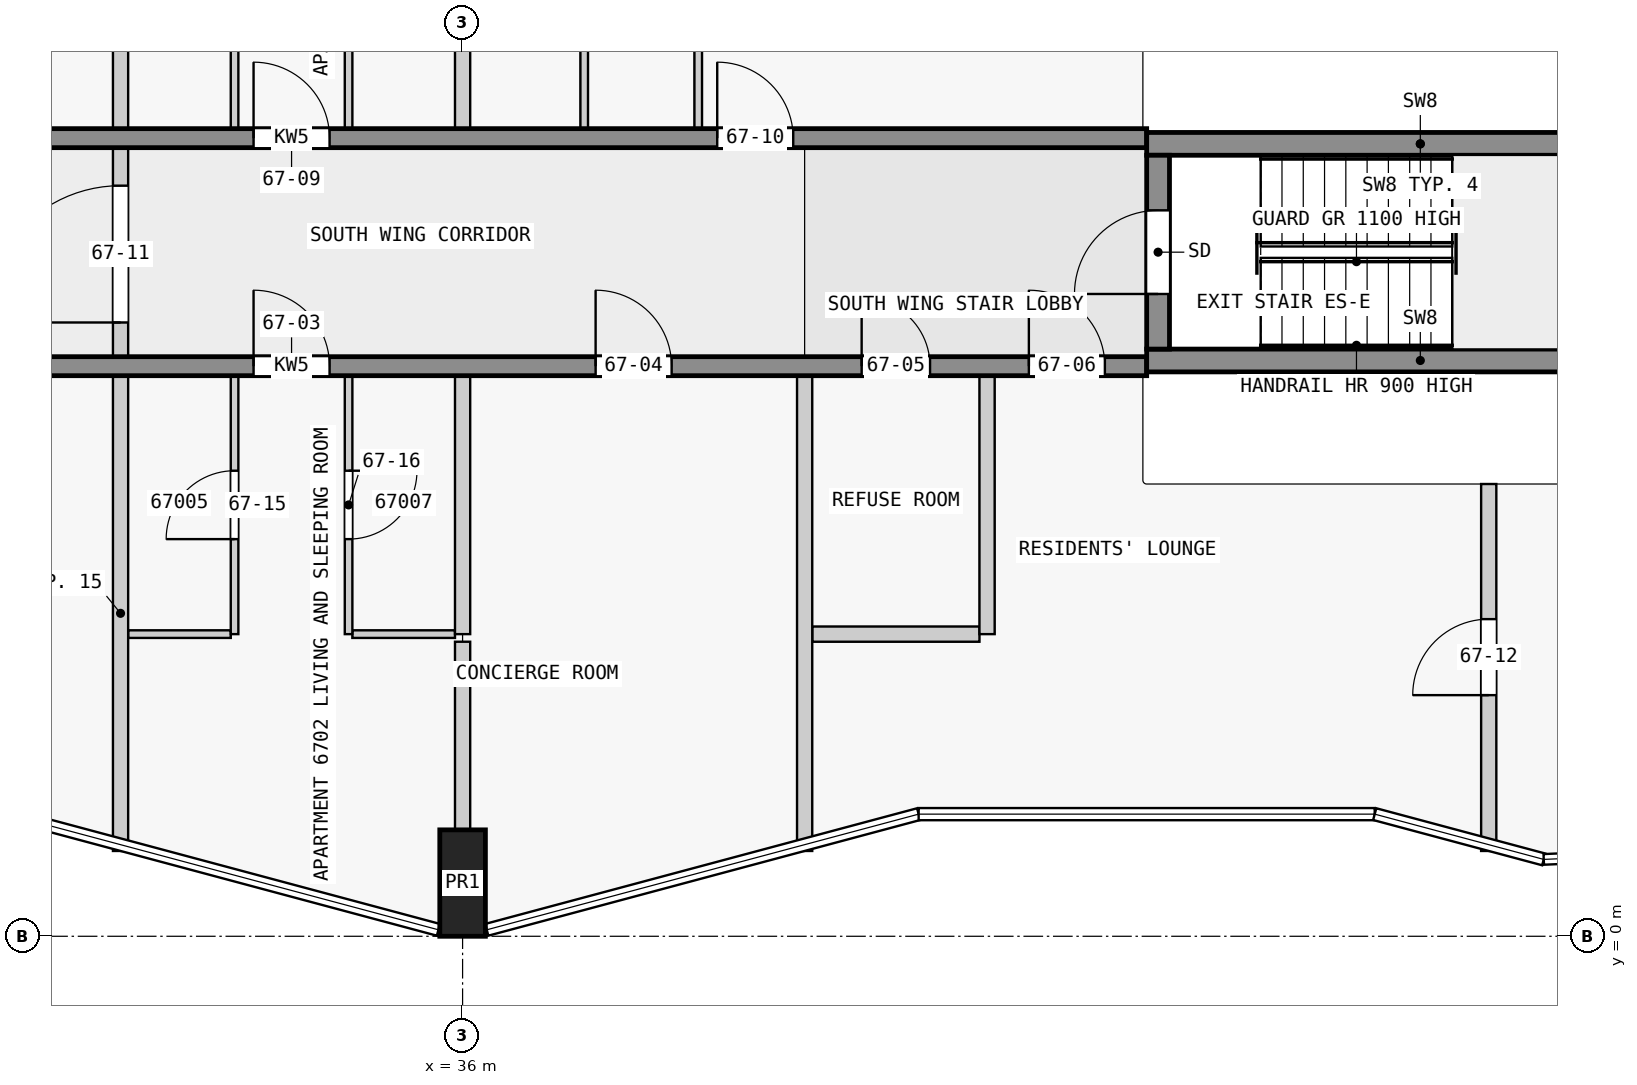
"""IFC4 building model, lengths in metres.
Left out: names, types, materials, properties, quantities, classifications, styles, units other than length and angle.
Written with IfcOpenShell. Run it as: python <this file> out.ifc"""

import sys

from ifc_helpers import new_model, si_unit, direction, frame, frame_2d, origin, origin_2d, place, context, subcontext, project, spatial, rectangle, extrude, element, fill, save


model = new_model("IFC4")
c1 = context("Model", 3, precision=1e-05, world=origin(), true_north=direction((0.0, 1.0)))
c2 = subcontext(c1, "Body", "Model", "MODEL_VIEW")
j1 = project(units=[si_unit("LENGTHUNIT", "METRE"), si_unit("PLANEANGLEUNIT", "RADIAN")], contexts=[c1])
p1 = place(None, origin())
s1 = spatial("IfcSite", under=j1, at=p1, CompositionType="ELEMENT")
p2 = place(p1, origin())
s2 = spatial("IfcBuilding", under=s1, at=p2, CompositionType="ELEMENT")
p3 = place(p2, frame((0.0, 0.0, 256.4)))
s3 = spatial("IfcBuildingStorey", under=s2, at=p3, CompositionType="ELEMENT", Elevation=256.4)
p4 = place(p3, frame((36.0, 0.7, 0.0), z_axis=(0.0, 0.0, 1.0), x_axis=(1.0, 0.0, 0.0)))
e1 = element("IfcColumn", 1, at=p4, inside=s3, PredefinedType="COLUMN", context=c2, shape_type="SweptSolid", body=[
    extrude(rectangle(XDim=0.6, YDim=1.4, at=origin_2d()), origin(), (0.0, 0.0, 1.0), 3.5),
])
p5 = place(p3, frame((45.15, 7.725, 0.0), z_axis=(0.0, 0.0, 1.0), x_axis=(0.0, 1.0, 0.0)))
e2 = element("IfcWall", 2, at=p5, inside=s3, PredefinedType="SHEAR", context=c2, shape_type="SweptSolid", body=[
    extrude(rectangle(XDim=2.55, YDim=0.3, at=frame_2d((1.275, 0.0))), origin(), (0.0, 0.0, 1.0), 3.5),
])
p6 = place(p5, frame((0.725, 0.0, 0.0)))
e3 = element("IfcOpeningElement", 3, at=p6, cuts=e2, PredefinedType="OPENING", context=c2, shape_type="SweptSolid", body=[
    extrude(rectangle(XDim=1.1, YDim=2.1, at=frame_2d((0.55, 1.05))), frame((0.0, 0.16, 0.0), z_axis=(0.0, -1.0, 0.0), x_axis=(1.0, 0.0, 0.0)), (0.0, 0.0, 1.0), 0.32),
])
for number, where, z_axis, x_axis in (
    (4, (45.0, 7.575, 0.0), (0.0, 0.0, 1.0), (1.0, 0.0, 0.0)),
    (5, (45.0, 10.425, 0.0), (0.0, 0.0, 1.0), (1.0, 0.0, 0.0)),
):
    element("IfcWall", number, at=place(p3, frame(where, z_axis=z_axis, x_axis=x_axis)), inside=s3, PredefinedType="SHEAR", context=c2, shape_type="SweptSolid", body=[
        extrude(rectangle(XDim=7.2, YDim=0.3, at=frame_2d((3.6, 0.0))), origin(), (0.0, 0.0, 1.0), 3.5),
    ])
p7 = place(p3, frame((22.5, 7.5, 0.0), z_axis=(0.0, 0.0, 1.0), x_axis=(1.0, 0.0, 0.0)))
e6 = element("IfcWall", 6, at=p7, inside=s3, PredefinedType="SHEAR", context=c2, shape_type="SweptSolid", body=[
    extrude(rectangle(XDim=22.5, YDim=0.25, at=frame_2d((11.25, 0.0))), origin(), (0.0, 0.0, 1.0), 3.25),
])
p8 = place(p7, frame((1.75, 0.0, 0.0)))
e7 = element("IfcOpeningElement", 7, at=p8, cuts=e6, PredefinedType="OPENING", context=c2, shape_type="SweptSolid", body=[
    extrude(rectangle(XDim=1.0, YDim=2.1, at=frame_2d((0.5, 1.05))), frame((0.0, 0.135, 0.0), z_axis=(0.0, -1.0, 0.0), x_axis=(1.0, 0.0, 0.0)), (0.0, 0.0, 1.0), 0.27),
])
p9 = place(p7, frame((5.85, 0.0, 0.0)))
e8 = element("IfcOpeningElement", 8, at=p9, cuts=e6, PredefinedType="OPENING", context=c2, shape_type="SweptSolid", body=[
    extrude(rectangle(XDim=1.8, YDim=2.1, at=frame_2d((0.9, 1.05))), frame((0.0, 0.135, 0.0), z_axis=(0.0, -1.0, 0.0), x_axis=(1.0, 0.0, 0.0)), (0.0, 0.0, 1.0), 0.27),
])
p10 = place(p7, frame((10.75, 0.0, 0.0)))
e9 = element("IfcOpeningElement", 9, at=p10, cuts=e6, PredefinedType="OPENING", context=c2, shape_type="SweptSolid", body=[
    extrude(rectangle(XDim=1.0, YDim=2.1, at=frame_2d((0.5, 1.05))), frame((0.0, 0.135, 0.0), z_axis=(0.0, -1.0, 0.0), x_axis=(1.0, 0.0, 0.0)), (0.0, 0.0, 1.0), 0.27),
])
p11 = place(p7, frame((15.25, 0.0, 0.0)))
e10 = element("IfcOpeningElement", 10, at=p11, cuts=e6, PredefinedType="OPENING", context=c2, shape_type="SweptSolid", body=[
    extrude(rectangle(XDim=1.0, YDim=2.1, at=frame_2d((0.5, 1.05))), frame((0.0, 0.135, 0.0), z_axis=(0.0, -1.0, 0.0), x_axis=(1.0, 0.0, 0.0)), (0.0, 0.0, 1.0), 0.27),
])
p12 = place(p7, frame((18.75, 0.0, 0.0)))
e11 = element("IfcOpeningElement", 11, at=p12, cuts=e6, PredefinedType="OPENING", context=c2, shape_type="SweptSolid", body=[
    extrude(rectangle(XDim=0.9, YDim=2.1, at=frame_2d((0.45, 1.05))), frame((0.0, 0.135, 0.0), z_axis=(0.0, -1.0, 0.0), x_axis=(1.0, 0.0, 0.0)), (0.0, 0.0, 1.0), 0.27),
])
p13 = place(p7, frame((20.95, 0.0, 0.0)))
e12 = element("IfcOpeningElement", 12, at=p13, cuts=e6, PredefinedType="OPENING", context=c2, shape_type="SweptSolid", body=[
    extrude(rectangle(XDim=1.0, YDim=2.1, at=frame_2d((0.5, 1.05))), frame((0.0, 0.135, 0.0), z_axis=(0.0, -1.0, 0.0), x_axis=(1.0, 0.0, 0.0)), (0.0, 0.0, 1.0), 0.27),
])
p14 = place(p3, frame((22.5, 10.5, 0.0), z_axis=(0.0, 0.0, 1.0), x_axis=(1.0, 0.0, 0.0)))
e13 = element("IfcWall", 13, at=p14, inside=s3, PredefinedType="SHEAR", context=c2, shape_type="SweptSolid", body=[
    extrude(rectangle(XDim=22.5, YDim=0.25, at=frame_2d((11.25, 0.0))), origin(), (0.0, 0.0, 1.0), 3.25),
])
p15 = place(p14, frame((1.75, 0.0, 0.0)))
e14 = element("IfcOpeningElement", 14, at=p15, cuts=e13, PredefinedType="OPENING", context=c2, shape_type="SweptSolid", body=[
    extrude(rectangle(XDim=1.0, YDim=2.1, at=frame_2d((0.5, 1.05))), frame((0.0, 0.135, 0.0), z_axis=(0.0, -1.0, 0.0), x_axis=(1.0, 0.0, 0.0)), (0.0, 0.0, 1.0), 0.27),
])
p16 = place(p14, frame((6.25, 0.0, 0.0)))
e15 = element("IfcOpeningElement", 15, at=p16, cuts=e13, PredefinedType="OPENING", context=c2, shape_type="SweptSolid", body=[
    extrude(rectangle(XDim=1.0, YDim=2.1, at=frame_2d((0.5, 1.05))), frame((0.0, 0.135, 0.0), z_axis=(0.0, -1.0, 0.0), x_axis=(1.0, 0.0, 0.0)), (0.0, 0.0, 1.0), 0.27),
])
p17 = place(p14, frame((10.75, 0.0, 0.0)))
e16 = element("IfcOpeningElement", 16, at=p17, cuts=e13, PredefinedType="OPENING", context=c2, shape_type="SweptSolid", body=[
    extrude(rectangle(XDim=1.0, YDim=2.1, at=frame_2d((0.5, 1.05))), frame((0.0, 0.135, 0.0), z_axis=(0.0, -1.0, 0.0), x_axis=(1.0, 0.0, 0.0)), (0.0, 0.0, 1.0), 0.27),
])
p18 = place(p14, frame((16.85, 0.0, 0.0)))
e17 = element("IfcOpeningElement", 17, at=p18, cuts=e13, PredefinedType="OPENING", context=c2, shape_type="SweptSolid", body=[
    extrude(rectangle(XDim=1.0, YDim=2.1, at=frame_2d((0.5, 1.05))), frame((0.0, 0.135, 0.0), z_axis=(0.0, -1.0, 0.0), x_axis=(1.0, 0.0, 0.0)), (0.0, 0.0, 1.0), 0.27),
])
for number, where, z_axis, x_axis in (
    (18, (31.6, 3.975, 0.0), (0.0, 0.0, 1.0), (1.0, 0.0, 0.0)),
    (19, (34.55, 3.975, 0.0), (0.0, 0.0, 1.0), (1.0, 0.0, 0.0)),
):
    element("IfcWall", number, at=place(p3, frame(where, z_axis=z_axis, x_axis=x_axis)), inside=s3, PredefinedType="PARTITIONING", context=c2, shape_type="SweptSolid", body=[
        extrude(rectangle(XDim=1.35, YDim=0.1, at=frame_2d((0.675, 0.0))), origin(), (0.0, 0.0, 1.0), 3.25),
    ])
p19 = place(p3, frame((40.6, 3.975, 0.0), z_axis=(0.0, 0.0, 1.0), x_axis=(1.0, 0.0, 0.0)))
e20 = element("IfcWall", 20, at=p19, inside=s3, PredefinedType="PARTITIONING", context=c2, shape_type="SweptSolid", body=[
    extrude(rectangle(XDim=2.2, YDim=0.2, at=frame_2d((1.1, 0.0))), origin(), (0.0, 0.0, 1.0), 3.25),
])
for number, where, z_axis, x_axis in (
    (21, (31.5, 1.122, 0.0), (0.0, 0.0, 1.0), (0.0, 1.0, 0.0)),
    (22, (31.5, 10.625, 0.0), (0.0, 0.0, 1.0), (0.0, 1.0, 0.0)),
):
    element("IfcWall", number, at=place(p3, frame(where, z_axis=z_axis, x_axis=x_axis)), inside=s3, PredefinedType="PARTITIONING", context=c2, shape_type="SweptSolid", body=[
        extrude(rectangle(XDim=6.253, YDim=0.2, at=frame_2d((3.126, 0.0))), origin(), (0.0, 0.0, 1.0), 3.25),
    ])
p20 = place(p3, frame((33.0, 3.975, 0.0), z_axis=(0.0, 0.0, 1.0), x_axis=(0.0, 1.0, 0.0)))
e23 = element("IfcWall", 23, at=p20, inside=s3, PredefinedType="PARTITIONING", context=c2, shape_type="SweptSolid", body=[
    extrude(rectangle(XDim=3.4, YDim=0.1, at=frame_2d((1.7, 0.0))), origin(), (0.0, 0.0, 1.0), 3.25),
])
p21 = place(p20, frame((1.25, 0.0, 0.0)))
e24 = element("IfcOpeningElement", 24, at=p21, cuts=e23, PredefinedType="OPENING", context=c2, shape_type="SweptSolid", body=[
    extrude(rectangle(XDim=0.9, YDim=2.1, at=frame_2d((0.45, 1.05))), frame((0.0, 0.06, 0.0), z_axis=(0.0, -1.0, 0.0), x_axis=(1.0, 0.0, 0.0)), (0.0, 0.0, 1.0), 0.12),
])
p22 = place(p3, frame((33.0, 10.625, 0.0), z_axis=(0.0, 0.0, 1.0), x_axis=(0.0, 1.0, 0.0)))
e25 = element("IfcWall", 25, at=p22, inside=s3, PredefinedType="PARTITIONING", context=c2, shape_type="SweptSolid", body=[
    extrude(rectangle(XDim=3.4, YDim=0.1, at=frame_2d((1.7, 0.0))), origin(), (0.0, 0.0, 1.0), 3.25),
])
p23 = place(p22, frame((1.25, 0.0, 0.0)))
e26 = element("IfcOpeningElement", 26, at=p23, cuts=e25, PredefinedType="OPENING", context=c2, shape_type="SweptSolid", body=[
    extrude(rectangle(XDim=0.9, YDim=2.1, at=frame_2d((0.45, 1.05))), frame((0.0, 0.06, 0.0), z_axis=(0.0, -1.0, 0.0), x_axis=(1.0, 0.0, 0.0)), (0.0, 0.0, 1.0), 0.12),
])
p24 = place(p3, frame((34.5, 7.375, 0.0), z_axis=(0.0, 0.0, 1.0), x_axis=(0.0, -1.0, 0.0)))
e27 = element("IfcWall", 27, at=p24, inside=s3, PredefinedType="PARTITIONING", context=c2, shape_type="SweptSolid", body=[
    extrude(rectangle(XDim=3.4, YDim=0.1, at=frame_2d((1.7, 0.0))), origin(), (0.0, 0.0, 1.0), 3.25),
])
p25 = place(p24, frame((1.25, 0.0, 0.0)))
e28 = element("IfcOpeningElement", 28, at=p25, cuts=e27, PredefinedType="OPENING", context=c2, shape_type="SweptSolid", body=[
    extrude(rectangle(XDim=0.9, YDim=2.1, at=frame_2d((0.45, 1.05))), frame((0.0, 0.06, 0.0), z_axis=(0.0, -1.0, 0.0), x_axis=(1.0, 0.0, 0.0)), (0.0, 0.0, 1.0), 0.12),
])
p26 = place(p3, frame((34.5, 13.975, 0.0), z_axis=(0.0, 0.0, 1.0), x_axis=(0.0, -1.0, 0.0)))
e29 = element("IfcWall", 29, at=p26, inside=s3, PredefinedType="PARTITIONING", context=c2, shape_type="SweptSolid", body=[
    extrude(rectangle(XDim=3.35, YDim=0.1, at=frame_2d((1.675, 0.0))), origin(), (0.0, 0.0, 1.0), 3.25),
])
p27 = place(p26, frame((1.25, 0.0, 0.0)))
e30 = element("IfcOpeningElement", 30, at=p27, cuts=e29, PredefinedType="OPENING", context=c2, shape_type="SweptSolid", body=[
    extrude(rectangle(XDim=0.9, YDim=2.1, at=frame_2d((0.45, 1.05))), frame((0.0, 0.06, 0.0), z_axis=(0.0, -1.0, 0.0), x_axis=(1.0, 0.0, 0.0)), (0.0, 0.0, 1.0), 0.12),
])
p28 = place(p3, frame((36.0, 3.875, 0.0), z_axis=(0.0, 0.0, 1.0), x_axis=(0.0, -1.0, 0.0)))
e31 = element("IfcWall", 31, at=p28, inside=s3, PredefinedType="PARTITIONING", context=c2, shape_type="SweptSolid", body=[
    extrude(rectangle(XDim=2.475, YDim=0.2, at=frame_2d((1.238, 0.0))), origin(), (0.0, 0.0, 1.0), 3.25),
])
for number, where, z_axis, x_axis in (
    (32, (36.0, 3.975, 0.0), (0.0, 0.0, 1.0), (0.0, 1.0, 0.0)),
    (33, (36.0, 10.625, 0.0), (0.0, 0.0, 1.0), (0.0, 1.0, 0.0)),
):
    element("IfcWall", number, at=place(p3, frame(where, z_axis=z_axis, x_axis=x_axis)), inside=s3, PredefinedType="PARTITIONING", context=c2, shape_type="SweptSolid", body=[
        extrude(rectangle(XDim=3.4, YDim=0.2, at=frame_2d((1.7, 0.0))), origin(), (0.0, 0.0, 1.0), 3.25),
    ])
p29 = place(p3, frame((37.6, 10.625, 0.0), z_axis=(0.0, 0.0, 1.0), x_axis=(0.0, 1.0, 0.0)))
e34 = element("IfcWall", 34, at=p29, inside=s3, PredefinedType="PARTITIONING", context=c2, shape_type="SweptSolid", body=[
    extrude(rectangle(XDim=3.35, YDim=0.1, at=frame_2d((1.675, 0.0))), origin(), (0.0, 0.0, 1.0), 3.25),
])
p30 = place(p3, frame((39.1, 10.625, 0.0), z_axis=(0.0, 0.0, 1.0), x_axis=(0.0, 1.0, 0.0)))
e35 = element("IfcWall", 35, at=p30, inside=s3, PredefinedType="PARTITIONING", context=c2, shape_type="SweptSolid", body=[
    extrude(rectangle(XDim=3.35, YDim=0.1, at=frame_2d((1.675, 0.0))), origin(), (0.0, 0.0, 1.0), 3.25),
])
p31 = place(p30, frame((1.25, 0.0, 0.0)))
e36 = element("IfcOpeningElement", 36, at=p31, cuts=e35, PredefinedType="OPENING", context=c2, shape_type="SweptSolid", body=[
    extrude(rectangle(XDim=0.9, YDim=2.1, at=frame_2d((0.45, 1.05))), frame((0.0, 0.06, 0.0), z_axis=(0.0, -1.0, 0.0), x_axis=(1.0, 0.0, 0.0)), (0.0, 0.0, 1.0), 0.12),
])
p32 = place(p3, frame((40.5, 1.122, 0.0), z_axis=(0.0, 0.0, 1.0), x_axis=(0.0, 1.0, 0.0)))
e37 = element("IfcWall", 37, at=p32, inside=s3, PredefinedType="PARTITIONING", context=c2, shape_type="SweptSolid", body=[
    extrude(rectangle(XDim=6.253, YDim=0.2, at=frame_2d((3.126, 0.0))), origin(), (0.0, 0.0, 1.0), 3.25),
])
p33 = place(p3, frame((42.9, 3.975, 0.0), z_axis=(0.0, 0.0, 1.0), x_axis=(0.0, 1.0, 0.0)))
e38 = element("IfcWall", 38, at=p33, inside=s3, PredefinedType="PARTITIONING", context=c2, shape_type="SweptSolid", body=[
    extrude(rectangle(XDim=3.4, YDim=0.2, at=frame_2d((1.7, 0.0))), origin(), (0.0, 0.0, 1.0), 3.25),
])
p34 = place(p3, frame((49.5, 1.122, 0.0), z_axis=(0.0, 0.0, 1.0), x_axis=(0.0, 1.0, 0.0)))
e39 = element("IfcWall", 39, at=p34, inside=s3, PredefinedType="PARTITIONING", context=c2, shape_type="SweptSolid", body=[
    extrude(rectangle(XDim=4.828, YDim=0.2, at=frame_2d((2.414, 0.0))), origin(), (0.0, 0.0, 1.0), 3.25),
])
p35 = place(p34, frame((2.05, 0.0, 0.0)))
e40 = element("IfcOpeningElement", 40, at=p35, cuts=e39, PredefinedType="OPENING", context=c2, shape_type="SweptSolid", body=[
    extrude(rectangle(XDim=1.0, YDim=2.1, at=frame_2d((0.5, 1.05))), frame((0.0, 0.11, 0.0), z_axis=(0.0, -1.0, 0.0), x_axis=(1.0, 0.0, 0.0)), (0.0, 0.0, 1.0), 0.22),
])
p36 = place(p3, frame((31.5, 7.475, 0.0), z_axis=(0.0, 0.0, 1.0), x_axis=(0.0, 1.0, 0.0)))
e41 = element("IfcWall", 41, at=p36, inside=s3, PredefinedType="PARTITIONING", context=c2, shape_type="SweptSolid", body=[
    extrude(rectangle(XDim=3.05, YDim=0.2, at=frame_2d((1.525, 0.0))), origin(), (0.0, 0.0, 1.0), 3.25),
])
p37 = place(p36, frame((0.6, 0.0, 0.0)))
e42 = element("IfcOpeningElement", 42, at=p37, cuts=e41, PredefinedType="OPENING", context=c2, shape_type="SweptSolid", body=[
    extrude(rectangle(XDim=1.8, YDim=2.1, at=frame_2d((0.9, 1.05))), frame((0.0, 0.11, 0.0), z_axis=(0.0, -1.0, 0.0), x_axis=(1.0, 0.0, 0.0)), (0.0, 0.0, 1.0), 0.22),
])
p38 = place(p6, origin())
e43 = element("IfcDoor", 43, at=p38, inside=s3, OperationType="SINGLE_SWING_LEFT", PredefinedType="DOOR", context=c2, shape_type="SweptSolid", body=[
    extrude(rectangle(XDim=1.1, YDim=2.1, at=frame_2d((0.55, 1.05))), frame((0.0, 0.025, 0.0), z_axis=(0.0, -1.0, 0.0), x_axis=(1.0, 0.0, 0.0)), (0.0, 0.0, 1.0), 0.05),
])
fill(e3, e43)
p39 = place(p10, origin())
e44 = element("IfcDoor", 44, at=p39, inside=s3, OperationType="SINGLE_SWING_LEFT", PredefinedType="DOOR", context=c2, shape_type="SweptSolid", body=[
    extrude(rectangle(XDim=1.0, YDim=2.1, at=frame_2d((0.5, 1.05))), frame((0.0, 0.025, 0.0), z_axis=(0.0, -1.0, 0.0), x_axis=(1.0, 0.0, 0.0)), (0.0, 0.0, 1.0), 0.05),
])
fill(e9, e44)
p40 = place(p11, origin())
e45 = element("IfcDoor", 45, at=p40, inside=s3, OperationType="SINGLE_SWING_RIGHT", PredefinedType="DOOR", context=c2, shape_type="SweptSolid", body=[
    extrude(rectangle(XDim=1.0, YDim=2.1, at=frame_2d((0.5, 1.05))), frame((0.0, 0.025, 0.0), z_axis=(0.0, -1.0, 0.0), x_axis=(1.0, 0.0, 0.0)), (0.0, 0.0, 1.0), 0.05),
])
fill(e10, e45)
p41 = place(p12, origin())
e46 = element("IfcDoor", 46, at=p41, inside=s3, OperationType="SINGLE_SWING_RIGHT", PredefinedType="DOOR", context=c2, shape_type="SweptSolid", body=[
    extrude(rectangle(XDim=0.9, YDim=2.1, at=frame_2d((0.45, 1.05))), frame((0.0, 0.025, 0.0), z_axis=(0.0, -1.0, 0.0), x_axis=(1.0, 0.0, 0.0)), (0.0, 0.0, 1.0), 0.05),
])
fill(e11, e46)
p42 = place(p13, origin())
e47 = element("IfcDoor", 47, at=p42, inside=s3, OperationType="SINGLE_SWING_RIGHT", PredefinedType="DOOR", context=c2, shape_type="SweptSolid", body=[
    extrude(rectangle(XDim=1.0, YDim=2.1, at=frame_2d((0.5, 1.05))), frame((0.0, 0.025, 0.0), z_axis=(0.0, -1.0, 0.0), x_axis=(1.0, 0.0, 0.0)), (0.0, 0.0, 1.0), 0.05),
])
fill(e12, e47)
p43 = place(p17, origin())
e48 = element("IfcDoor", 48, at=p43, inside=s3, OperationType="SINGLE_SWING_LEFT", PredefinedType="DOOR", context=c2, shape_type="SweptSolid", body=[
    extrude(rectangle(XDim=1.0, YDim=2.1, at=frame_2d((0.5, 1.05))), frame((0.0, 0.025, 0.0), z_axis=(0.0, -1.0, 0.0), x_axis=(1.0, 0.0, 0.0)), (0.0, 0.0, 1.0), 0.05),
])
fill(e16, e48)
p44 = place(p18, origin())
e49 = element("IfcDoor", 49, at=p44, inside=s3, OperationType="SINGLE_SWING_RIGHT", PredefinedType="DOOR", context=c2, shape_type="SweptSolid", body=[
    extrude(rectangle(XDim=1.0, YDim=2.1, at=frame_2d((0.5, 1.05))), frame((0.0, 0.025, 0.0), z_axis=(0.0, -1.0, 0.0), x_axis=(1.0, 0.0, 0.0)), (0.0, 0.0, 1.0), 0.05),
])
fill(e17, e49)
p45 = place(p37, origin())
e50 = element("IfcDoor", 50, at=p45, inside=s3, OperationType="SINGLE_SWING_LEFT", PredefinedType="DOOR", context=c2, shape_type="SweptSolid", body=[
    extrude(rectangle(XDim=1.8, YDim=2.1, at=frame_2d((0.9, 1.05))), frame((0.0, 0.025, 0.0), z_axis=(0.0, -1.0, 0.0), x_axis=(1.0, 0.0, 0.0)), (0.0, 0.0, 1.0), 0.05),
])
fill(e42, e50)
p46 = place(p35, origin())
e51 = element("IfcDoor", 51, at=p46, inside=s3, OperationType="SINGLE_SWING_RIGHT", PredefinedType="DOOR", context=c2, shape_type="SweptSolid", body=[
    extrude(rectangle(XDim=1.0, YDim=2.1, at=frame_2d((0.5, 1.05))), frame((0.0, 0.025, 0.0), z_axis=(0.0, -1.0, 0.0), x_axis=(1.0, 0.0, 0.0)), (0.0, 0.0, 1.0), 0.05),
])
fill(e40, e51)
p47 = place(p21, origin())
e52 = element("IfcDoor", 52, at=p47, inside=s3, OperationType="SINGLE_SWING_LEFT", PredefinedType="DOOR", context=c2, shape_type="SweptSolid", body=[
    extrude(rectangle(XDim=0.9, YDim=2.1, at=frame_2d((0.45, 1.05))), frame((0.0, 0.025, 0.0), z_axis=(0.0, -1.0, 0.0), x_axis=(1.0, 0.0, 0.0)), (0.0, 0.0, 1.0), 0.05),
])
fill(e24, e52)
p48 = place(p25, origin())
e53 = element("IfcDoor", 53, at=p48, inside=s3, OperationType="SINGLE_SWING_LEFT", PredefinedType="DOOR", context=c2, shape_type="SweptSolid", body=[
    extrude(rectangle(XDim=0.9, YDim=2.1, at=frame_2d((0.45, 1.05))), frame((0.0, 0.025, 0.0), z_axis=(0.0, -1.0, 0.0), x_axis=(1.0, 0.0, 0.0)), (0.0, 0.0, 1.0), 0.05),
])
fill(e28, e53)
save(model, sys.argv[1])
